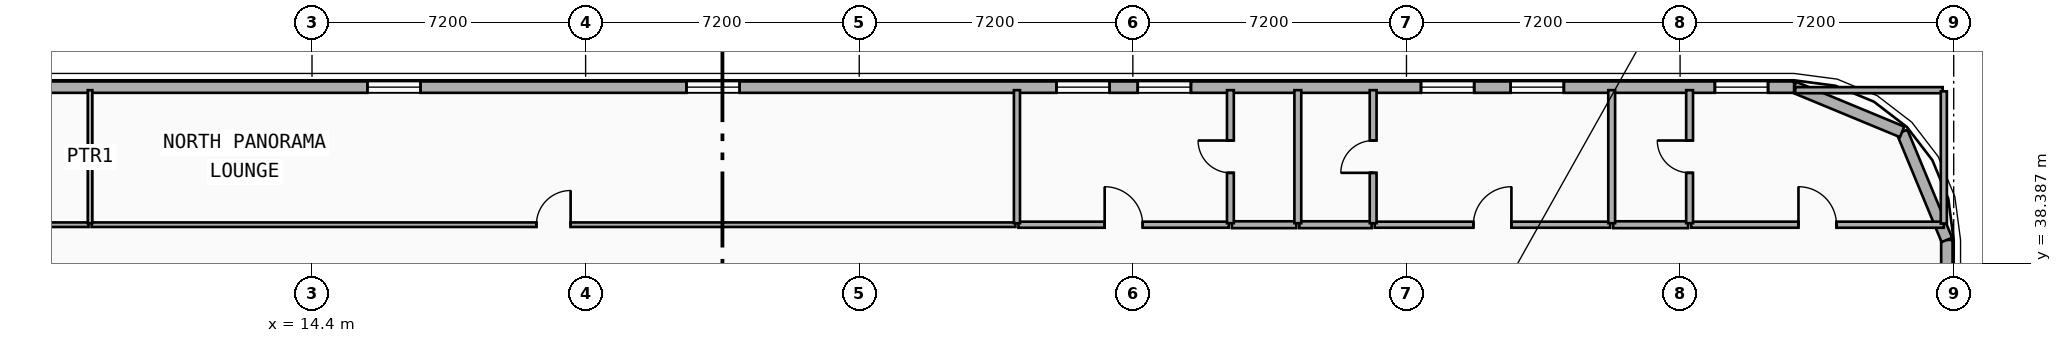
"""IFC4 building model, lengths in metres.
Left out: names, types, materials, properties, quantities, classifications, styles, units other than length and angle.
Written with IfcOpenShell. Run it as: python <this file> out.ifc"""

import sys

from ifc_helpers import new_model, si_unit, direction, frame, frame_2d, origin, place, context, subcontext, project, spatial, rectangle, extrude, element, fill, save


model = new_model("IFC4")
c1 = context("Model", 3, precision=1e-05, world=origin(), true_north=direction((0.0, 1.0)))
c2 = subcontext(c1, "Body", "Model", "MODEL_VIEW")
j1 = project(units=[si_unit("LENGTHUNIT", "METRE"), si_unit("PLANEANGLEUNIT", "RADIAN")], contexts=[c1])
p1 = place(None, origin())
s1 = spatial("IfcSite", under=j1, at=p1, CompositionType="ELEMENT")
p2 = place(p1, origin())
s2 = spatial("IfcBuilding", under=s1, at=p2, CompositionType="ELEMENT")
p3 = place(p2, frame((0.0, 0.0, 129.3)))
s3 = spatial("IfcBuildingStorey", under=s2, at=p3, CompositionType="ELEMENT", Elevation=129.3)
p4 = place(p3, frame((57.42, 39.0, 0.0), z_axis=(0.0, 0.0, 1.0), x_axis=(0.0, -1.0, 0.0)))
e1 = element("IfcWall", 1, at=p4, inside=s3, PredefinedType="SOLIDWALL", context=c2, shape_type="SweptSolid", body=[
    extrude(rectangle(XDim=18.0, YDim=0.3, at=frame_2d((9.0, 0.0))), origin(), (0.0, 0.0, 1.0), 3.28),
])
p5 = place(p4, frame((8.882, 0.0, 0.65)))
e2 = element("IfcOpeningElement", 2, at=p5, cuts=e1, PredefinedType="OPENING", context=c2, shape_type="SweptSolid", body=[
    extrude(rectangle(XDim=1.4, YDim=1.8, at=frame_2d((0.7, 0.9))), frame((0.0, 0.16, 0.0), z_axis=(0.0, -1.0, 0.0), x_axis=(1.0, 0.0, 0.0)), (0.0, 0.0, 1.0), 0.32),
])
p6 = place(p4, frame((3.621, 0.0, 0.65)))
e3 = element("IfcOpeningElement", 3, at=p6, cuts=e1, PredefinedType="OPENING", context=c2, shape_type="SweptSolid", body=[
    extrude(rectangle(XDim=1.4, YDim=1.8, at=frame_2d((0.7, 0.9))), frame((0.0, 0.16, 0.0), z_axis=(0.0, -1.0, 0.0), x_axis=(1.0, 0.0, 0.0)), (0.0, 0.0, 1.0), 0.32),
])
p7 = place(p4, frame((14.127, 0.0, 0.65)))
e4 = element("IfcOpeningElement", 4, at=p7, cuts=e1, PredefinedType="OPENING", context=c2, shape_type="SweptSolid", body=[
    extrude(rectangle(XDim=1.4, YDim=1.8, at=frame_2d((0.7, 0.9))), frame((0.0, 0.16, 0.0), z_axis=(0.0, -1.0, 0.0), x_axis=(1.0, 0.0, 0.0)), (0.0, 0.0, 1.0), 0.32),
])
p8 = place(p4, frame((15.903, 0.0, 0.65)))
e5 = element("IfcOpeningElement", 5, at=p8, cuts=e1, PredefinedType="OPENING", context=c2, shape_type="SweptSolid", body=[
    extrude(rectangle(XDim=1.4, YDim=1.8, at=frame_2d((0.7, 0.9))), frame((0.0, 0.16, 0.0), z_axis=(0.0, -1.0, 0.0), x_axis=(1.0, 0.0, 0.0)), (0.0, 0.0, 1.0), 0.32),
])
p9 = place(p3, frame((56.243, 41.843, 0.0), z_axis=(0.0, 0.0, 1.0), x_axis=(0.382636798336, -0.92389884758, 0.0)))
e6 = element("IfcWall", 6, at=p9, inside=s3, PredefinedType="SOLIDWALL", context=c2, shape_type="SweptSolid", body=[
    extrude(rectangle(XDim=3.077, YDim=0.3, at=frame_2d((1.538, 0.0))), origin(), (0.0, 0.0, 1.0), 3.28),
])
p10 = place(p3, frame((53.4, 43.02, 0.0), z_axis=(0.0, 0.0, 1.0), x_axis=(0.923882414032, -0.382676475685, 0.0)))
e7 = element("IfcWall", 7, at=p10, inside=s3, PredefinedType="SOLIDWALL", context=c2, shape_type="SweptSolid", body=[
    extrude(rectangle(XDim=3.077, YDim=0.3, at=frame_2d((1.539, 0.0))), origin(), (0.0, 0.0, 1.0), 3.28),
])
p11 = place(p3, frame((4.2, 43.02, 0.0), z_axis=(0.0, 0.0, 1.0), x_axis=(1.0, 0.0, 0.0)))
e8 = element("IfcWall", 8, at=p11, inside=s3, PredefinedType="SOLIDWALL", context=c2, shape_type="SweptSolid", body=[
    extrude(rectangle(XDim=49.2, YDim=0.3, at=frame_2d((24.6, 0.0))), origin(), (0.0, 0.0, 1.0), 3.28),
])
p12 = place(p11, frame((11.657, 0.0, 0.85)))
e9 = element("IfcOpeningElement", 9, at=p12, cuts=e8, PredefinedType="OPENING", context=c2, shape_type="SweptSolid", body=[
    extrude(rectangle(XDim=1.4, YDim=1.8, at=frame_2d((0.7, 0.9))), frame((0.0, 0.16, 0.0), z_axis=(0.0, -1.0, 0.0), x_axis=(1.0, 0.0, 0.0)), (0.0, 0.0, 1.0), 0.32),
])
p13 = place(p11, frame((20.053, 0.0, 0.85)))
e10 = element("IfcOpeningElement", 10, at=p13, cuts=e8, PredefinedType="OPENING", context=c2, shape_type="SweptSolid", body=[
    extrude(rectangle(XDim=1.4, YDim=1.8, at=frame_2d((0.7, 0.9))), frame((0.0, 0.16, 0.0), z_axis=(0.0, -1.0, 0.0), x_axis=(1.0, 0.0, 0.0)), (0.0, 0.0, 1.0), 0.32),
])
p14 = place(p11, frame((29.789, 0.0, 0.85)))
e11 = element("IfcOpeningElement", 11, at=p14, cuts=e8, PredefinedType="OPENING", context=c2, shape_type="SweptSolid", body=[
    extrude(rectangle(XDim=1.4, YDim=1.8, at=frame_2d((0.7, 0.9))), frame((0.0, 0.16, 0.0), z_axis=(0.0, -1.0, 0.0), x_axis=(1.0, 0.0, 0.0)), (0.0, 0.0, 1.0), 0.32),
])
p15 = place(p11, frame((31.928, 0.0, 0.85)))
e12 = element("IfcOpeningElement", 12, at=p15, cuts=e8, PredefinedType="OPENING", context=c2, shape_type="SweptSolid", body=[
    extrude(rectangle(XDim=1.4, YDim=1.8, at=frame_2d((0.7, 0.9))), frame((0.0, 0.16, 0.0), z_axis=(0.0, -1.0, 0.0), x_axis=(1.0, 0.0, 0.0)), (0.0, 0.0, 1.0), 0.32),
])
p16 = place(p11, frame((39.382, 0.0, 0.85)))
e13 = element("IfcOpeningElement", 13, at=p16, cuts=e8, PredefinedType="OPENING", context=c2, shape_type="SweptSolid", body=[
    extrude(rectangle(XDim=1.4, YDim=1.8, at=frame_2d((0.7, 0.9))), frame((0.0, 0.16, 0.0), z_axis=(0.0, -1.0, 0.0), x_axis=(1.0, 0.0, 0.0)), (0.0, 0.0, 1.0), 0.32),
])
p17 = place(p11, frame((41.741, 0.0, 0.85)))
e14 = element("IfcOpeningElement", 14, at=p17, cuts=e8, PredefinedType="OPENING", context=c2, shape_type="SweptSolid", body=[
    extrude(rectangle(XDim=1.4, YDim=1.8, at=frame_2d((0.7, 0.9))), frame((0.0, 0.16, 0.0), z_axis=(0.0, -1.0, 0.0), x_axis=(1.0, 0.0, 0.0)), (0.0, 0.0, 1.0), 0.32),
])
p18 = place(p11, frame((47.115, 0.0, 0.85)))
e15 = element("IfcOpeningElement", 15, at=p18, cuts=e8, PredefinedType="OPENING", context=c2, shape_type="SweptSolid", body=[
    extrude(rectangle(XDim=1.4, YDim=1.8, at=frame_2d((0.7, 0.9))), frame((0.0, 0.16, 0.0), z_axis=(0.0, -1.0, 0.0), x_axis=(1.0, 0.0, 0.0)), (0.0, 0.0, 1.0), 0.32),
])
p19 = place(p3, frame((0.26, 39.4, 0.0), z_axis=(0.0, 0.0, 1.0), x_axis=(1.0, 0.0, 0.0)))
e16 = element("IfcWall", 16, at=p19, inside=s3, PredefinedType="PARTITIONING", context=c2, shape_type="SweptSolid", body=[
    extrude(rectangle(XDim=8.26, YDim=0.12, at=frame_2d((4.13, 0.0))), origin(), (0.0, 0.0, 1.0), 3.28),
])
p20 = place(p19, frame((3.68, 0.0, 0.0)))
e17 = element("IfcOpeningElement", 17, at=p20, cuts=e16, PredefinedType="OPENING", context=c2, shape_type="SweptSolid", body=[
    extrude(rectangle(XDim=0.9, YDim=2.1, at=frame_2d((0.45, 1.05))), frame((0.0, 0.07, 0.0), z_axis=(0.0, -1.0, 0.0), x_axis=(1.0, 0.0, 0.0)), (0.0, 0.0, 1.0), 0.14),
])
p21 = place(p3, frame((8.6, 39.4, 0.0), z_axis=(0.0, 0.0, 1.0), x_axis=(1.0, 0.0, 0.0)))
e18 = element("IfcWall", 18, at=p21, inside=s3, PredefinedType="PARTITIONING", context=c2, shape_type="SweptSolid", body=[
    extrude(rectangle(XDim=24.31, YDim=0.12, at=frame_2d((12.155, 0.0))), origin(), (0.0, 0.0, 1.0), 3.28),
])
p22 = place(p21, frame((11.705, 0.0, 0.0)))
e19 = element("IfcOpeningElement", 19, at=p22, cuts=e18, PredefinedType="OPENING", context=c2, shape_type="SweptSolid", body=[
    extrude(rectangle(XDim=0.9, YDim=2.1, at=frame_2d((0.45, 1.05))), frame((0.0, 0.07, 0.0), z_axis=(0.0, -1.0, 0.0), x_axis=(1.0, 0.0, 0.0)), (0.0, 0.0, 1.0), 0.14),
])
p23 = place(p3, frame((32.99, 39.4, 0.0), z_axis=(0.0, 0.0, 1.0), x_axis=(1.0, 0.0, 0.0)))
e20 = element("IfcWall", 20, at=p23, inside=s3, PredefinedType="PARTITIONING", context=c2, shape_type="SweptSolid", body=[
    extrude(rectangle(XDim=5.537, YDim=0.16, at=frame_2d((2.769, 0.0))), origin(), (0.0, 0.0, 1.0), 3.28),
])
p24 = place(p23, frame((2.269, 0.0, 0.0)))
e21 = element("IfcOpeningElement", 21, at=p24, cuts=e20, PredefinedType="OPENING", context=c2, shape_type="SweptSolid", body=[
    extrude(rectangle(XDim=1.0, YDim=2.15, at=frame_2d((0.5, 1.075))), frame((0.0, 0.09, 0.0), z_axis=(0.0, -1.0, 0.0), x_axis=(1.0, 0.0, 0.0)), (0.0, 0.0, 1.0), 0.18),
])
p25 = place(p3, frame((38.607, 39.4, 0.0), z_axis=(0.0, 0.0, 1.0), x_axis=(1.0, 0.0, 0.0)))
e22 = element("IfcWall", 22, at=p25, inside=s3, PredefinedType="PLUMBINGWALL", context=c2, shape_type="SweptSolid", body=[
    extrude(rectangle(XDim=1.694, YDim=0.18, at=frame_2d((0.847, 0.0))), origin(), (0.0, 0.0, 1.0), 3.28),
])
p26 = place(p3, frame((42.363, 39.4, 0.0), z_axis=(0.0, 0.0, 1.0), x_axis=(1.0, 0.0, 0.0)))
e23 = element("IfcWall", 23, at=p26, inside=s3, PredefinedType="PARTITIONING", context=c2, shape_type="SweptSolid", body=[
    extrude(rectangle(XDim=6.197, YDim=0.16, at=frame_2d((3.099, 0.0))), origin(), (0.0, 0.0, 1.0), 3.28),
])
p27 = place(p26, frame((2.598, 0.0, 0.0)))
e24 = element("IfcOpeningElement", 24, at=p27, cuts=e23, PredefinedType="OPENING", context=c2, shape_type="SweptSolid", body=[
    extrude(rectangle(XDim=1.0, YDim=2.15, at=frame_2d((0.5, 1.075))), frame((0.0, 0.09, 0.0), z_axis=(0.0, -1.0, 0.0), x_axis=(1.0, 0.0, 0.0)), (0.0, 0.0, 1.0), 0.18),
])
p28 = place(p3, frame((40.381, 39.4, 0.0), z_axis=(0.0, 0.0, 1.0), x_axis=(1.0, 0.0, 0.0)))
e25 = element("IfcWall", 25, at=p28, inside=s3, PredefinedType="PLUMBINGWALL", context=c2, shape_type="SweptSolid", body=[
    extrude(rectangle(XDim=1.902, YDim=0.18, at=frame_2d((0.951, 0.0))), origin(), (0.0, 0.0, 1.0), 3.28),
])
p29 = place(p3, frame((50.69, 39.4, 0.0), z_axis=(0.0, 0.0, 1.0), x_axis=(1.0, 0.0, 0.0)))
e26 = element("IfcWall", 26, at=p29, inside=s3, PredefinedType="PARTITIONING", context=c2, shape_type="SweptSolid", body=[
    extrude(rectangle(XDim=6.65, YDim=0.16, at=frame_2d((3.325, 0.0))), origin(), (0.0, 0.0, 1.0), 3.28),
])
p30 = place(p29, frame((2.825, 0.0, 0.0)))
e27 = element("IfcOpeningElement", 27, at=p30, cuts=e26, PredefinedType="OPENING", context=c2, shape_type="SweptSolid", body=[
    extrude(rectangle(XDim=1.0, YDim=2.15, at=frame_2d((0.5, 1.075))), frame((0.0, 0.09, 0.0), z_axis=(0.0, -1.0, 0.0), x_axis=(1.0, 0.0, 0.0)), (0.0, 0.0, 1.0), 0.18),
])
p31 = place(p3, frame((48.64, 39.4, 0.0), z_axis=(0.0, 0.0, 1.0), x_axis=(1.0, 0.0, 0.0)))
e28 = element("IfcWall", 28, at=p31, inside=s3, PredefinedType="PLUMBINGWALL", context=c2, shape_type="SweptSolid", body=[
    extrude(rectangle(XDim=1.97, YDim=0.18, at=frame_2d((0.985, 0.0))), origin(), (0.0, 0.0, 1.0), 3.28),
])
p32 = place(p3, frame((8.56, 39.44, 0.0), z_axis=(0.0, 0.0, 1.0), x_axis=(0.0, 1.0, 0.0)))
e29 = element("IfcWall", 29, at=p32, inside=s3, PredefinedType="PARTITIONING", context=c2, shape_type="SweptSolid", body=[
    extrude(rectangle(XDim=3.5, YDim=0.12, at=frame_2d((1.75, 0.0))), origin(), (0.0, 0.0, 1.0), 3.28),
])
p33 = place(p3, frame((32.95, 39.44, 0.0), z_axis=(0.0, 0.0, 1.0), x_axis=(0.0, 1.0, 0.0)))
e30 = element("IfcWall", 30, at=p33, inside=s3, PredefinedType="PARTITIONING", context=c2, shape_type="SweptSolid", body=[
    extrude(rectangle(XDim=3.5, YDim=0.16, at=frame_2d((1.75, 0.0))), origin(), (0.0, 0.0, 1.0), 3.28),
])
p34 = place(p3, frame((38.567, 39.44, 0.0), z_axis=(0.0, 0.0, 1.0), x_axis=(0.0, 1.0, 0.0)))
e31 = element("IfcWall", 31, at=p34, inside=s3, PredefinedType="PLUMBINGWALL", context=c2, shape_type="SweptSolid", body=[
    extrude(rectangle(XDim=3.5, YDim=0.18, at=frame_2d((1.75, 0.0))), origin(), (0.0, 0.0, 1.0), 3.28),
])
p35 = place(p34, frame((1.325, 0.0, 0.0)))
e32 = element("IfcOpeningElement", 32, at=p35, cuts=e31, PredefinedType="OPENING", context=c2, shape_type="SweptSolid", body=[
    extrude(rectangle(XDim=0.85, YDim=2.1, at=frame_2d((0.425, 1.05))), frame((0.0, 0.1, 0.0), z_axis=(0.0, -1.0, 0.0), x_axis=(1.0, 0.0, 0.0)), (0.0, 0.0, 1.0), 0.2),
])
p36 = place(p3, frame((40.341, 39.44, 0.0), z_axis=(0.0, 0.0, 1.0), x_axis=(0.0, 1.0, 0.0)))
e33 = element("IfcWall", 33, at=p36, inside=s3, PredefinedType="PLUMBINGWALL", context=c2, shape_type="SweptSolid", body=[
    extrude(rectangle(XDim=3.5, YDim=0.18, at=frame_2d((1.75, 0.0))), origin(), (0.0, 0.0, 1.0), 3.28),
])
p37 = place(p3, frame((42.323, 39.44, 0.0), z_axis=(0.0, 0.0, 1.0), x_axis=(0.0, 1.0, 0.0)))
e34 = element("IfcWall", 34, at=p37, inside=s3, PredefinedType="PLUMBINGWALL", context=c2, shape_type="SweptSolid", body=[
    extrude(rectangle(XDim=3.5, YDim=0.18, at=frame_2d((1.75, 0.0))), origin(), (0.0, 0.0, 1.0), 3.28),
])
p38 = place(p37, frame((1.325, 0.0, 0.0)))
e35 = element("IfcOpeningElement", 35, at=p38, cuts=e34, PredefinedType="OPENING", context=c2, shape_type="SweptSolid", body=[
    extrude(rectangle(XDim=0.85, YDim=2.1, at=frame_2d((0.425, 1.05))), frame((0.0, 0.1, 0.0), z_axis=(0.0, -1.0, 0.0), x_axis=(1.0, 0.0, 0.0)), (0.0, 0.0, 1.0), 0.2),
])
p39 = place(p3, frame((48.6, 39.44, 0.0), z_axis=(0.0, 0.0, 1.0), x_axis=(0.0, 1.0, 0.0)))
e36 = element("IfcWall", 36, at=p39, inside=s3, PredefinedType="PLUMBINGWALL", context=c2, shape_type="SweptSolid", body=[
    extrude(rectangle(XDim=3.5, YDim=0.18, at=frame_2d((1.75, 0.0))), origin(), (0.0, 0.0, 1.0), 3.28),
])
p40 = place(p3, frame((50.65, 39.44, 0.0), z_axis=(0.0, 0.0, 1.0), x_axis=(0.0, 1.0, 0.0)))
e37 = element("IfcWall", 37, at=p40, inside=s3, PredefinedType="PLUMBINGWALL", context=c2, shape_type="SweptSolid", body=[
    extrude(rectangle(XDim=3.5, YDim=0.18, at=frame_2d((1.75, 0.0))), origin(), (0.0, 0.0, 1.0), 3.28),
])
p41 = place(p40, frame((1.325, 0.0, 0.0)))
e38 = element("IfcOpeningElement", 38, at=p41, cuts=e37, PredefinedType="OPENING", context=c2, shape_type="SweptSolid", body=[
    extrude(rectangle(XDim=0.85, YDim=2.1, at=frame_2d((0.425, 1.05))), frame((0.0, 0.1, 0.0), z_axis=(0.0, -1.0, 0.0), x_axis=(1.0, 0.0, 0.0)), (0.0, 0.0, 1.0), 0.2),
])
p42 = place(p3, frame((53.43, 42.94, 0.0), z_axis=(0.0, 0.0, 1.0), x_axis=(1.0, 0.0, 0.0)))
e39 = element("IfcWall", 39, at=p42, inside=s3, PredefinedType="PARTITIONING", context=c2, shape_type="SweptSolid", body=[
    extrude(rectangle(XDim=3.88, YDim=0.16, at=frame_2d((1.94, 0.0))), origin(), (0.0, 0.0, 1.0), 3.28),
])
p43 = place(p3, frame((57.34, 39.43, 0.0), z_axis=(0.0, 0.0, 1.0), x_axis=(0.0, 1.0, 0.0)))
e40 = element("IfcWall", 40, at=p43, inside=s3, PredefinedType="PARTITIONING", context=c2, shape_type="SweptSolid", body=[
    extrude(rectangle(XDim=3.48, YDim=0.16, at=frame_2d((1.74, 0.0))), origin(), (0.0, 0.0, 1.0), 3.28),
])
p44 = place(p12, origin())
e41 = element("IfcWindow", 41, at=p44, inside=s3, PartitioningType="SINGLE_PANEL", PredefinedType="WINDOW", context=c2, shape_type="SweptSolid", body=[
    extrude(rectangle(XDim=1.4, YDim=1.8, at=frame_2d((0.7, 0.9))), frame((0.0, 0.03, 0.0), z_axis=(0.0, -1.0, 0.0), x_axis=(1.0, 0.0, 0.0)), (0.0, 0.0, 1.0), 0.06),
])
fill(e9, e41)
p45 = place(p13, origin())
e42 = element("IfcWindow", 42, at=p45, inside=s3, PartitioningType="SINGLE_PANEL", PredefinedType="WINDOW", context=c2, shape_type="SweptSolid", body=[
    extrude(rectangle(XDim=1.4, YDim=1.8, at=frame_2d((0.7, 0.9))), frame((0.0, 0.03, 0.0), z_axis=(0.0, -1.0, 0.0), x_axis=(1.0, 0.0, 0.0)), (0.0, 0.0, 1.0), 0.06),
])
fill(e10, e42)
p46 = place(p14, origin())
e43 = element("IfcWindow", 43, at=p46, inside=s3, PartitioningType="SINGLE_PANEL", PredefinedType="WINDOW", context=c2, shape_type="SweptSolid", body=[
    extrude(rectangle(XDim=1.4, YDim=1.8, at=frame_2d((0.7, 0.9))), frame((0.0, 0.03, 0.0), z_axis=(0.0, -1.0, 0.0), x_axis=(1.0, 0.0, 0.0)), (0.0, 0.0, 1.0), 0.06),
])
fill(e11, e43)
p47 = place(p15, origin())
e44 = element("IfcWindow", 44, at=p47, inside=s3, PartitioningType="SINGLE_PANEL", PredefinedType="WINDOW", context=c2, shape_type="SweptSolid", body=[
    extrude(rectangle(XDim=1.4, YDim=1.8, at=frame_2d((0.7, 0.9))), frame((0.0, 0.03, 0.0), z_axis=(0.0, -1.0, 0.0), x_axis=(1.0, 0.0, 0.0)), (0.0, 0.0, 1.0), 0.06),
])
fill(e12, e44)
p48 = place(p16, origin())
e45 = element("IfcWindow", 45, at=p48, inside=s3, PartitioningType="SINGLE_PANEL", PredefinedType="WINDOW", context=c2, shape_type="SweptSolid", body=[
    extrude(rectangle(XDim=1.4, YDim=1.8, at=frame_2d((0.7, 0.9))), frame((0.0, 0.03, 0.0), z_axis=(0.0, -1.0, 0.0), x_axis=(1.0, 0.0, 0.0)), (0.0, 0.0, 1.0), 0.06),
])
fill(e13, e45)
p49 = place(p17, origin())
e46 = element("IfcWindow", 46, at=p49, inside=s3, PartitioningType="SINGLE_PANEL", PredefinedType="WINDOW", context=c2, shape_type="SweptSolid", body=[
    extrude(rectangle(XDim=1.4, YDim=1.8, at=frame_2d((0.7, 0.9))), frame((0.0, 0.03, 0.0), z_axis=(0.0, -1.0, 0.0), x_axis=(1.0, 0.0, 0.0)), (0.0, 0.0, 1.0), 0.06),
])
fill(e14, e46)
p50 = place(p18, origin())
e47 = element("IfcWindow", 47, at=p50, inside=s3, PartitioningType="SINGLE_PANEL", PredefinedType="WINDOW", context=c2, shape_type="SweptSolid", body=[
    extrude(rectangle(XDim=1.4, YDim=1.8, at=frame_2d((0.7, 0.9))), frame((0.0, 0.03, 0.0), z_axis=(0.0, -1.0, 0.0), x_axis=(1.0, 0.0, 0.0)), (0.0, 0.0, 1.0), 0.06),
])
fill(e15, e47)
p51 = place(p22, origin())
e48 = element("IfcDoor", 48, at=p51, inside=s3, OperationType="SINGLE_SWING_RIGHT", PredefinedType="DOOR", context=c2, shape_type="SweptSolid", body=[
    extrude(rectangle(XDim=0.9, YDim=2.1, at=frame_2d((0.45, 1.05))), frame((0.0, 0.025, 0.0), z_axis=(0.0, -1.0, 0.0), x_axis=(1.0, 0.0, 0.0)), (0.0, 0.0, 1.0), 0.05),
])
fill(e19, e48)
p52 = place(p24, origin())
e49 = element("IfcDoor", 49, at=p52, inside=s3, OperationType="SINGLE_SWING_LEFT", PredefinedType="DOOR", context=c2, shape_type="SweptSolid", body=[
    extrude(rectangle(XDim=1.0, YDim=2.15, at=frame_2d((0.5, 1.075))), frame((0.0, 0.025, 0.0), z_axis=(0.0, -1.0, 0.0), x_axis=(1.0, 0.0, 0.0)), (0.0, 0.0, 1.0), 0.05),
])
fill(e21, e49)
p53 = place(p27, origin())
e50 = element("IfcDoor", 50, at=p53, inside=s3, OperationType="SINGLE_SWING_RIGHT", PredefinedType="DOOR", context=c2, shape_type="SweptSolid", body=[
    extrude(rectangle(XDim=1.0, YDim=2.15, at=frame_2d((0.5, 1.075))), frame((0.0, 0.025, 0.0), z_axis=(0.0, -1.0, 0.0), x_axis=(1.0, 0.0, 0.0)), (0.0, 0.0, 1.0), 0.05),
])
fill(e24, e50)
p54 = place(p30, origin())
e51 = element("IfcDoor", 51, at=p54, inside=s3, OperationType="SINGLE_SWING_LEFT", PredefinedType="DOOR", context=c2, shape_type="SweptSolid", body=[
    extrude(rectangle(XDim=1.0, YDim=2.15, at=frame_2d((0.5, 1.075))), frame((0.0, 0.025, 0.0), z_axis=(0.0, -1.0, 0.0), x_axis=(1.0, 0.0, 0.0)), (0.0, 0.0, 1.0), 0.05),
])
fill(e27, e51)
p55 = place(p35, origin())
e52 = element("IfcDoor", 52, at=p55, inside=s3, OperationType="SINGLE_SWING_RIGHT", PredefinedType="DOOR", context=c2, shape_type="SweptSolid", body=[
    extrude(rectangle(XDim=0.85, YDim=2.1, at=frame_2d((0.425, 1.05))), frame((0.0, 0.025, 0.0), z_axis=(0.0, -1.0, 0.0), x_axis=(1.0, 0.0, 0.0)), (0.0, 0.0, 1.0), 0.05),
])
fill(e32, e52)
p56 = place(p38, origin())
e53 = element("IfcDoor", 53, at=p56, inside=s3, OperationType="SINGLE_SWING_LEFT", PredefinedType="DOOR", context=c2, shape_type="SweptSolid", body=[
    extrude(rectangle(XDim=0.85, YDim=2.1, at=frame_2d((0.425, 1.05))), frame((0.0, 0.025, 0.0), z_axis=(0.0, -1.0, 0.0), x_axis=(1.0, 0.0, 0.0)), (0.0, 0.0, 1.0), 0.05),
])
fill(e35, e53)
p57 = place(p41, origin())
e54 = element("IfcDoor", 54, at=p57, inside=s3, OperationType="SINGLE_SWING_RIGHT", PredefinedType="DOOR", context=c2, shape_type="SweptSolid", body=[
    extrude(rectangle(XDim=0.85, YDim=2.1, at=frame_2d((0.425, 1.05))), frame((0.0, 0.025, 0.0), z_axis=(0.0, -1.0, 0.0), x_axis=(1.0, 0.0, 0.0)), (0.0, 0.0, 1.0), 0.05),
])
fill(e38, e54)
save(model, sys.argv[1])
